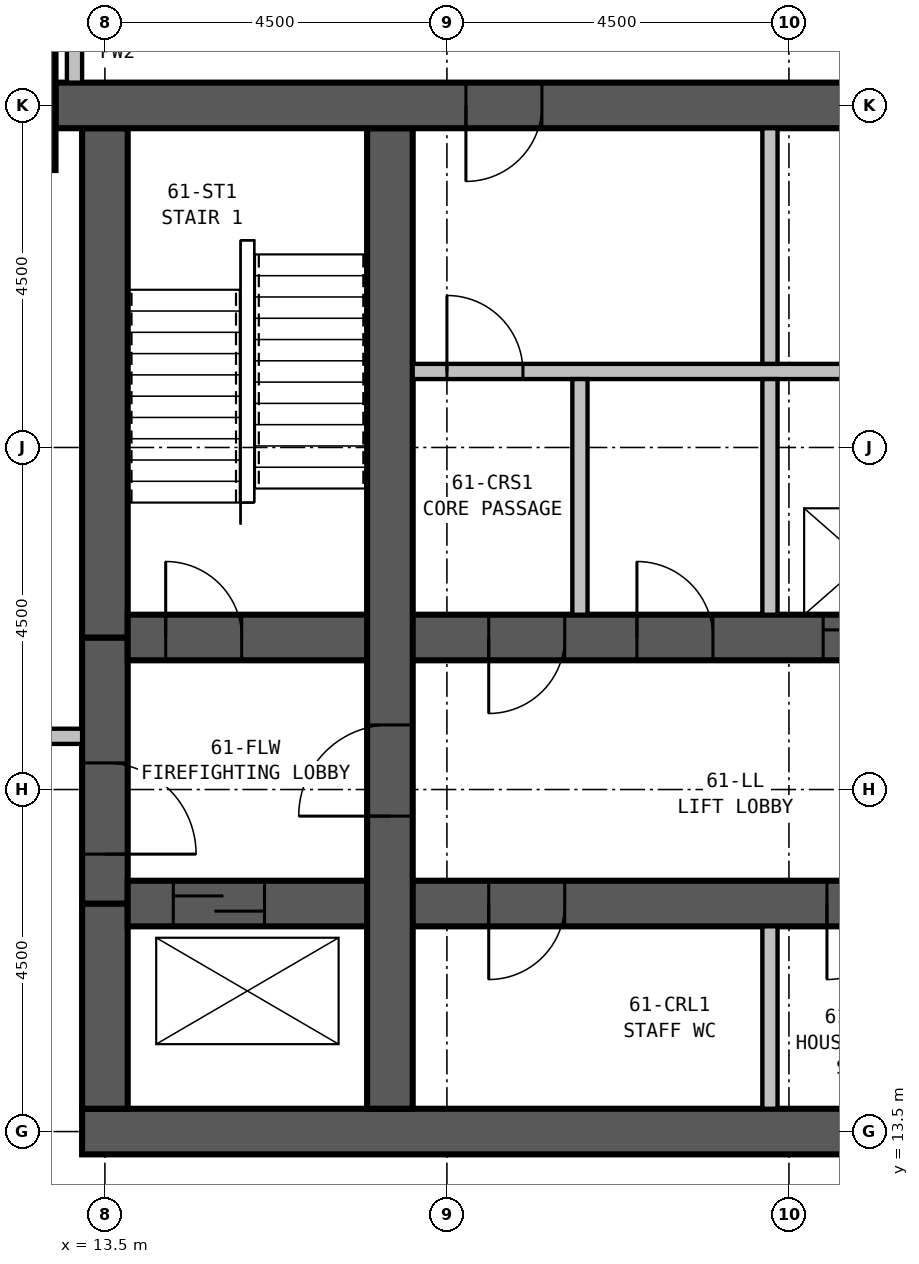
"""IFC4 building model, lengths in metres.
Left out: names, types, materials, properties, quantities, classifications, styles, units other than length and angle.
Written with IfcOpenShell. Run it as: python <this file> out.ifc"""

import sys

from ifc_helpers import new_model, si_unit, direction, frame, frame_2d, origin, origin_2d, place, context, subcontext, project, spatial, rectangle, extrude, element, fill, save


model = new_model("IFC4")
c1 = context("Model", 3, precision=1e-05, world=origin(), true_north=direction((0.0, 1.0)))
c2 = subcontext(c1, "Body", "Model", "MODEL_VIEW")
j1 = project(units=[si_unit("LENGTHUNIT", "METRE"), si_unit("PLANEANGLEUNIT", "RADIAN")], contexts=[c1])
p1 = place(None, origin())
s1 = spatial("IfcSite", under=j1, at=p1, CompositionType="ELEMENT")
p2 = place(p1, origin())
s2 = spatial("IfcBuilding", under=s1, at=p2, CompositionType="ELEMENT")
p3 = place(p2, frame((0.0, 0.0, 236.9)))
s3 = spatial("IfcBuildingStorey", under=s2, at=p3, CompositionType="ELEMENT", Elevation=236.9)
p4 = place(p3, frame((12.0, 27.0, 0.0), z_axis=(0.0, 0.0, 1.0), x_axis=(1.0, 0.0, 0.0)))
e1 = element("IfcColumn", 1, at=p4, inside=s3, PredefinedType="COLUMN", context=c2, shape_type="SweptSolid", body=[
    extrude(rectangle(XDim=1.7, YDim=1.7, at=origin_2d()), origin(), (0.0, 0.0, 1.0), 3.9),
])
p5 = place(p3, frame((13.2, 13.5, 0.0), z_axis=(0.0, 0.0, 1.0), x_axis=(1.0, 0.0, 0.0)))
e2 = element("IfcWall", 2, at=p5, inside=s3, PredefinedType="SHEAR", context=c2, shape_type="SweptSolid", body=[
    extrude(rectangle(XDim=23.1, YDim=0.6, at=frame_2d((11.55, 0.0))), origin(), (0.0, 0.0, 1.0), 3.9),
])
p6 = place(p3, frame((36.3, 27.0, 0.0), z_axis=(0.0, 0.0, 1.0), x_axis=(-1.0, 0.0, 0.0)))
e3 = element("IfcWall", 3, at=p6, inside=s3, PredefinedType="SHEAR", context=c2, shape_type="SweptSolid", body=[
    extrude(rectangle(XDim=23.45, YDim=0.6, at=frame_2d((11.725, 0.0))), origin(), (0.0, 0.0, 1.0), 3.9),
])
p7 = place(p6, frame((17.05, 0.0, 0.0)))
e4 = element("IfcOpeningElement", 4, at=p7, cuts=e3, PredefinedType="OPENING", context=c2, shape_type="SweptSolid", body=[
    extrude(rectangle(XDim=1.0, YDim=2.1, at=frame_2d((0.5, 1.05))), frame((0.0, 0.31, 0.0), z_axis=(0.0, -1.0, 0.0), x_axis=(1.0, 0.0, 0.0)), (0.0, 0.0, 1.0), 0.62),
])
p8 = place(p6, frame((12.05, 0.0, 0.0)))
e5 = element("IfcOpeningElement", 5, at=p8, cuts=e3, PredefinedType="OPENING", context=c2, shape_type="SweptSolid", body=[
    extrude(rectangle(XDim=1.0, YDim=2.1, at=frame_2d((0.5, 1.05))), frame((0.0, 0.31, 0.0), z_axis=(0.0, -1.0, 0.0), x_axis=(1.0, 0.0, 0.0)), (0.0, 0.0, 1.0), 0.62),
])
p9 = place(p6, frame((7.05, 0.0, 0.0)))
e6 = element("IfcOpeningElement", 6, at=p9, cuts=e3, PredefinedType="OPENING", context=c2, shape_type="SweptSolid", body=[
    extrude(rectangle(XDim=1.0, YDim=2.1, at=frame_2d((0.5, 1.05))), frame((0.0, 0.31, 0.0), z_axis=(0.0, -1.0, 0.0), x_axis=(1.0, 0.0, 0.0)), (0.0, 0.0, 1.0), 0.62),
])
p10 = place(p3, frame((17.25, 13.8, 0.0), z_axis=(0.0, 0.0, 1.0), x_axis=(0.0, 1.0, 0.0)))
e7 = element("IfcWall", 7, at=p10, inside=s3, PredefinedType="SHEAR", context=c2, shape_type="SweptSolid", body=[
    extrude(rectangle(XDim=12.9, YDim=0.6, at=frame_2d((6.45, 0.0))), origin(), (0.0, 0.0, 1.0), 3.9),
])
p11 = place(p10, frame((3.85, 0.0, 0.0)))
e8 = element("IfcOpeningElement", 8, at=p11, cuts=e7, PredefinedType="OPENING", context=c2, shape_type="SweptSolid", body=[
    extrude(rectangle(XDim=1.2, YDim=2.1, at=frame_2d((0.6, 1.05))), frame((0.0, 0.31, 0.0), z_axis=(0.0, -1.0, 0.0), x_axis=(1.0, 0.0, 0.0)), (0.0, 0.0, 1.0), 0.62),
])
p12 = place(p3, frame((13.8, 16.5, 0.0), z_axis=(0.0, 0.0, 1.0), x_axis=(1.0, 0.0, 0.0)))
e9 = element("IfcWall", 9, at=p12, inside=s3, PredefinedType="SHEAR", context=c2, shape_type="SweptSolid", body=[
    extrude(rectangle(XDim=21.9, YDim=0.6, at=frame_2d((10.95, 0.0))), origin(), (0.0, 0.0, 1.0), 3.9),
])
p13 = place(p12, frame((5.75, 0.0, 0.0), z_axis=(0.0, 0.0, 1.0), x_axis=(-1.0, 0.0, 0.0)))
e10 = element("IfcOpeningElement", 10, at=p13, cuts=e9, PredefinedType="OPENING", context=c2, shape_type="SweptSolid", body=[
    extrude(rectangle(XDim=1.0, YDim=2.1, at=frame_2d((0.5, 1.05))), frame((0.0, 0.31, 0.0), z_axis=(0.0, -1.0, 0.0), x_axis=(1.0, 0.0, 0.0)), (0.0, 0.0, 1.0), 0.62),
])
p14 = place(p12, frame((10.2, 0.0, 0.0), z_axis=(0.0, 0.0, 1.0), x_axis=(-1.0, 0.0, 0.0)))
e11 = element("IfcOpeningElement", 11, at=p14, cuts=e9, PredefinedType="OPENING", context=c2, shape_type="SweptSolid", body=[
    extrude(rectangle(XDim=1.0, YDim=2.1, at=frame_2d((0.5, 1.05))), frame((0.0, 0.31, 0.0), z_axis=(0.0, -1.0, 0.0), x_axis=(1.0, 0.0, 0.0)), (0.0, 0.0, 1.0), 0.62),
])
p15 = place(p12, frame((12.7, 0.0, 0.0), z_axis=(0.0, 0.0, 1.0), x_axis=(-1.0, 0.0, 0.0)))
e12 = element("IfcOpeningElement", 12, at=p15, cuts=e9, PredefinedType="OPENING", context=c2, shape_type="SweptSolid", body=[
    extrude(rectangle(XDim=1.0, YDim=2.1, at=frame_2d((0.5, 1.05))), frame((0.0, 0.31, 0.0), z_axis=(0.0, -1.0, 0.0), x_axis=(1.0, 0.0, 0.0)), (0.0, 0.0, 1.0), 0.62),
])
p16 = place(p12, frame((17.15, 0.0, 0.0), z_axis=(0.0, 0.0, 1.0), x_axis=(-1.0, 0.0, 0.0)))
e13 = element("IfcOpeningElement", 13, at=p16, cuts=e9, PredefinedType="OPENING", context=c2, shape_type="SweptSolid", body=[
    extrude(rectangle(XDim=1.0, YDim=2.1, at=frame_2d((0.5, 1.05))), frame((0.0, 0.31, 0.0), z_axis=(0.0, -1.0, 0.0), x_axis=(1.0, 0.0, 0.0)), (0.0, 0.0, 1.0), 0.62),
])
p17 = place(p12, frame((0.6, 0.0, 0.0)))
e14 = element("IfcOpeningElement", 14, at=p17, cuts=e9, PredefinedType="OPENING", context=c2, shape_type="SweptSolid", body=[
    extrude(rectangle(XDim=1.2, YDim=2.1, at=frame_2d((0.6, 1.05))), frame((0.0, 0.31, 0.0), z_axis=(0.0, -1.0, 0.0), x_axis=(1.0, 0.0, 0.0)), (0.0, 0.0, 1.0), 0.62),
])
p18 = place(p12, frame((19.6, 0.0, 0.0)))
e15 = element("IfcOpeningElement", 15, at=p18, cuts=e9, PredefinedType="OPENING", context=c2, shape_type="SweptSolid", body=[
    extrude(rectangle(XDim=1.2, YDim=2.1, at=frame_2d((0.6, 1.05))), frame((0.0, 0.31, 0.0), z_axis=(0.0, -1.0, 0.0), x_axis=(1.0, 0.0, 0.0)), (0.0, 0.0, 1.0), 0.62),
])
p19 = place(p3, frame((13.8, 20.0, 0.0), z_axis=(0.0, 0.0, 1.0), x_axis=(1.0, 0.0, 0.0)))
e16 = element("IfcWall", 16, at=p19, inside=s3, PredefinedType="SHEAR", context=c2, shape_type="SweptSolid", body=[
    extrude(rectangle(XDim=21.9, YDim=0.6, at=frame_2d((10.95, 0.0))), origin(), (0.0, 0.0, 1.0), 3.9),
])
p20 = place(p19, frame((0.5, 0.0, 0.0)))
e17 = element("IfcOpeningElement", 17, at=p20, cuts=e16, PredefinedType="OPENING", context=c2, shape_type="SweptSolid", body=[
    extrude(rectangle(XDim=1.0, YDim=2.1, at=frame_2d((0.5, 1.05))), frame((0.0, 0.31, 0.0), z_axis=(0.0, -1.0, 0.0), x_axis=(1.0, 0.0, 0.0)), (0.0, 0.0, 1.0), 0.62),
])
p21 = place(p19, frame((20.5, 0.0, 0.0)))
e18 = element("IfcOpeningElement", 18, at=p21, cuts=e16, PredefinedType="OPENING", context=c2, shape_type="SweptSolid", body=[
    extrude(rectangle(XDim=1.0, YDim=2.1, at=frame_2d((0.5, 1.05))), frame((0.0, 0.31, 0.0), z_axis=(0.0, -1.0, 0.0), x_axis=(1.0, 0.0, 0.0)), (0.0, 0.0, 1.0), 0.62),
])
p22 = place(p19, frame((9.15, 0.0, 0.0)))
e19 = element("IfcOpeningElement", 19, at=p22, cuts=e16, PredefinedType="OPENING", context=c2, shape_type="SweptSolid", body=[
    extrude(rectangle(XDim=1.1, YDim=2.1, at=frame_2d((0.55, 1.05))), frame((0.0, 0.31, 0.0), z_axis=(0.0, -1.0, 0.0), x_axis=(1.0, 0.0, 0.0)), (0.0, 0.0, 1.0), 0.62),
])
p23 = place(p19, frame((11.65, 0.0, 0.0)))
e20 = element("IfcOpeningElement", 20, at=p23, cuts=e16, PredefinedType="OPENING", context=c2, shape_type="SweptSolid", body=[
    extrude(rectangle(XDim=1.1, YDim=2.1, at=frame_2d((0.55, 1.05))), frame((0.0, 0.31, 0.0), z_axis=(0.0, -1.0, 0.0), x_axis=(1.0, 0.0, 0.0)), (0.0, 0.0, 1.0), 0.62),
])
p24 = place(p19, frame((14.15, 0.0, 0.0)))
e21 = element("IfcOpeningElement", 21, at=p24, cuts=e16, PredefinedType="OPENING", context=c2, shape_type="SweptSolid", body=[
    extrude(rectangle(XDim=1.1, YDim=2.1, at=frame_2d((0.55, 1.05))), frame((0.0, 0.31, 0.0), z_axis=(0.0, -1.0, 0.0), x_axis=(1.0, 0.0, 0.0)), (0.0, 0.0, 1.0), 0.62),
])
p25 = place(p19, frame((16.65, 0.0, 0.0)))
e22 = element("IfcOpeningElement", 22, at=p25, cuts=e16, PredefinedType="OPENING", context=c2, shape_type="SweptSolid", body=[
    extrude(rectangle(XDim=1.1, YDim=2.1, at=frame_2d((0.55, 1.05))), frame((0.0, 0.31, 0.0), z_axis=(0.0, -1.0, 0.0), x_axis=(1.0, 0.0, 0.0)), (0.0, 0.0, 1.0), 0.62),
])
p26 = place(p19, frame((5.75, 0.0, 0.0), z_axis=(0.0, 0.0, 1.0), x_axis=(-1.0, 0.0, 0.0)))
e23 = element("IfcOpeningElement", 23, at=p26, cuts=e16, PredefinedType="OPENING", context=c2, shape_type="SweptSolid", body=[
    extrude(rectangle(XDim=1.0, YDim=2.1, at=frame_2d((0.5, 1.05))), frame((0.0, 0.31, 0.0), z_axis=(0.0, -1.0, 0.0), x_axis=(1.0, 0.0, 0.0)), (0.0, 0.0, 1.0), 0.62),
])
p27 = place(p19, frame((6.7, 0.0, 0.0)))
e24 = element("IfcOpeningElement", 24, at=p27, cuts=e16, PredefinedType="OPENING", context=c2, shape_type="SweptSolid", body=[
    extrude(rectangle(XDim=1.0, YDim=2.1, at=frame_2d((0.5, 1.05))), frame((0.0, 0.31, 0.0), z_axis=(0.0, -1.0, 0.0), x_axis=(1.0, 0.0, 0.0)), (0.0, 0.0, 1.0), 0.62),
])
p28 = place(p3, frame((13.5, 26.7, 0.0), z_axis=(0.0, 0.0, 1.0), x_axis=(0.0, -1.0, 0.0)))
e25 = element("IfcWall", 25, at=p28, inside=s3, PredefinedType="SHEAR", context=c2, shape_type="SweptSolid", body=[
    extrude(rectangle(XDim=6.7, YDim=0.6, at=frame_2d((3.35, 0.0))), origin(), (0.0, 0.0, 1.0), 3.9),
])
p29 = place(p3, frame((13.5, 20.0, 0.0), z_axis=(0.0, 0.0, 1.0), x_axis=(0.0, -1.0, 0.0)))
e26 = element("IfcWall", 26, at=p29, inside=s3, PredefinedType="SHEAR", context=c2, shape_type="SweptSolid", body=[
    extrude(rectangle(XDim=3.5, YDim=0.6, at=frame_2d((1.75, 0.0))), origin(), (0.0, 0.0, 1.0), 3.9),
])
p30 = place(p29, frame((1.65, 0.0, 0.0)))
e27 = element("IfcOpeningElement", 27, at=p30, cuts=e26, PredefinedType="OPENING", context=c2, shape_type="SweptSolid", body=[
    extrude(rectangle(XDim=1.2, YDim=2.1, at=frame_2d((0.6, 1.05))), frame((0.0, 0.31, 0.0), z_axis=(0.0, -1.0, 0.0), x_axis=(1.0, 0.0, 0.0)), (0.0, 0.0, 1.0), 0.62),
])
p31 = place(p3, frame((13.5, 16.5, 0.0), z_axis=(0.0, 0.0, 1.0), x_axis=(0.0, -1.0, 0.0)))
e28 = element("IfcWall", 28, at=p31, inside=s3, PredefinedType="SHEAR", context=c2, shape_type="SweptSolid", body=[
    extrude(rectangle(XDim=2.7, YDim=0.6, at=frame_2d((1.35, 0.0))), origin(), (0.0, 0.0, 1.0), 3.9),
])
p32 = place(p3, frame((13.517, 40.649, 0.0), z_axis=(0.0, 0.0, 1.0), x_axis=(-0.110433201132, -0.993883548555, 0.0)))
e29 = element("IfcWall", 29, at=p32, inside=s3, PredefinedType="STANDARD", context=c2, shape_type="SweptSolid", body=[
    extrude(rectangle(XDim=31.994, YDim=0.3, at=frame_2d((15.997, 0.0))), origin(), (0.0, 0.0, 1.0), 2.5),
])
p33 = place(p32, frame((1.664, 0.0, 0.5)))
e30 = element("IfcOpeningElement", 30, at=p33, cuts=e29, PredefinedType="OPENING", context=c2, shape_type="SweptSolid", body=[
    extrude(rectangle(XDim=1.5, YDim=1.85, at=frame_2d((0.75, 0.925))), frame((0.0, 0.16, 0.0), z_axis=(0.0, -1.0, 0.0), x_axis=(1.0, 0.0, 0.0)), (0.0, 0.0, 1.0), 0.32),
])
p34 = place(p32, frame((6.192, 0.0, 0.5)))
e31 = element("IfcOpeningElement", 31, at=p34, cuts=e29, PredefinedType="OPENING", context=c2, shape_type="SweptSolid", body=[
    extrude(rectangle(XDim=1.5, YDim=1.85, at=frame_2d((0.75, 0.925))), frame((0.0, 0.16, 0.0), z_axis=(0.0, -1.0, 0.0), x_axis=(1.0, 0.0, 0.0)), (0.0, 0.0, 1.0), 0.32),
])
p35 = place(p32, frame((15.247, 0.0, 0.5)))
e32 = element("IfcOpeningElement", 32, at=p35, cuts=e29, PredefinedType="OPENING", context=c2, shape_type="SweptSolid", body=[
    extrude(rectangle(XDim=1.5, YDim=1.85, at=frame_2d((0.75, 0.925))), frame((0.0, 0.16, 0.0), z_axis=(0.0, -1.0, 0.0), x_axis=(1.0, 0.0, 0.0)), (0.0, 0.0, 1.0), 0.32),
])
p36 = place(p32, frame((19.775, 0.0, 0.5)))
e33 = element("IfcOpeningElement", 33, at=p36, cuts=e29, PredefinedType="OPENING", context=c2, shape_type="SweptSolid", body=[
    extrude(rectangle(XDim=1.5, YDim=1.85, at=frame_2d((0.75, 0.925))), frame((0.0, 0.16, 0.0), z_axis=(0.0, -1.0, 0.0), x_axis=(1.0, 0.0, 0.0)), (0.0, 0.0, 1.0), 0.32),
])
p37 = place(p32, frame((24.302, 0.0, 0.5)))
e34 = element("IfcOpeningElement", 34, at=p37, cuts=e29, PredefinedType="OPENING", context=c2, shape_type="SweptSolid", body=[
    extrude(rectangle(XDim=1.5, YDim=1.85, at=frame_2d((0.75, 0.925))), frame((0.0, 0.16, 0.0), z_axis=(0.0, -1.0, 0.0), x_axis=(1.0, 0.0, 0.0)), (0.0, 0.0, 1.0), 0.32),
])
p38 = place(p32, frame((28.83, 0.0, 0.5)))
e35 = element("IfcOpeningElement", 35, at=p38, cuts=e29, PredefinedType="OPENING", context=c2, shape_type="SweptSolid", body=[
    extrude(rectangle(XDim=1.5, YDim=1.85, at=frame_2d((0.75, 0.925))), frame((0.0, 0.16, 0.0), z_axis=(0.0, -1.0, 0.0), x_axis=(1.0, 0.0, 0.0)), (0.0, 0.0, 1.0), 0.32),
])
p39 = place(p3, frame((13.2, 18.7, 0.0), z_axis=(0.0, 0.0, 1.0), x_axis=(-1.0, 0.0, 0.0)))
e36 = element("IfcWall", 36, at=p39, inside=s3, PredefinedType="PARTITIONING", context=c2, shape_type="SweptSolid", body=[
    extrude(rectangle(XDim=1.35, YDim=0.2, at=frame_2d((0.675, 0.0))), origin(), (0.0, 0.0, 1.0), 3.65),
])
p40 = place(p3, frame((13.1, 27.3, 0.0), z_axis=(0.0, 0.0, 1.0), x_axis=(0.0, 1.0, 0.0)))
e37 = element("IfcWall", 37, at=p40, inside=s3, PredefinedType="PARTITIONING", context=c2, shape_type="SweptSolid", body=[
    extrude(rectangle(XDim=1.9, YDim=0.2, at=frame_2d((0.95, 0.0))), origin(), (0.0, 0.0, 1.0), 2.5),
])
p41 = place(p3, frame((19.75, 20.3, 0.0), z_axis=(0.0, 0.0, 1.0), x_axis=(0.0, 1.0, 0.0)))
e38 = element("IfcWall", 38, at=p41, inside=s3, PredefinedType="PARTITIONING", context=c2, shape_type="SweptSolid", body=[
    extrude(rectangle(XDim=3.1, YDim=0.2, at=frame_2d((1.55, 0.0))), origin(), (0.0, 0.0, 1.0), 3.65),
])
p42 = place(p3, frame((22.25, 13.8, 0.0), z_axis=(0.0, 0.0, 1.0), x_axis=(0.0, 1.0, 0.0)))
e39 = element("IfcWall", 39, at=p42, inside=s3, PredefinedType="PARTITIONING", context=c2, shape_type="SweptSolid", body=[
    extrude(rectangle(XDim=2.4, YDim=0.2, at=frame_2d((1.2, 0.0))), origin(), (0.0, 0.0, 1.0), 3.65),
])
p43 = place(p3, frame((22.25, 20.3, 0.0), z_axis=(0.0, 0.0, 1.0), x_axis=(0.0, 1.0, 0.0)))
e40 = element("IfcWall", 40, at=p43, inside=s3, PredefinedType="PARTITIONING", context=c2, shape_type="SweptSolid", body=[
    extrude(rectangle(XDim=3.1, YDim=0.2, at=frame_2d((1.55, 0.0))), origin(), (0.0, 0.0, 1.0), 3.65),
])
p44 = place(p3, frame((17.55, 23.5, 0.0), z_axis=(0.0, 0.0, 1.0), x_axis=(1.0, 0.0, 0.0)))
e41 = element("IfcWall", 41, at=p44, inside=s3, PredefinedType="PARTITIONING", context=c2, shape_type="SweptSolid", body=[
    extrude(rectangle(XDim=14.4, YDim=0.2, at=frame_2d((7.2, 0.0))), origin(), (0.0, 0.0, 1.0), 3.65),
])
p45 = place(p44, frame((0.45, 0.0, 0.0)))
e42 = element("IfcOpeningElement", 42, at=p45, cuts=e41, PredefinedType="OPENING", context=c2, shape_type="SweptSolid", body=[
    extrude(rectangle(XDim=1.0, YDim=2.1, at=frame_2d((0.5, 1.05))), frame((0.0, 0.11, 0.0), z_axis=(0.0, -1.0, 0.0), x_axis=(1.0, 0.0, 0.0)), (0.0, 0.0, 1.0), 0.22),
])
p46 = place(p3, frame((22.25, 23.6, 0.0), z_axis=(0.0, 0.0, 1.0), x_axis=(0.0, 1.0, 0.0)))
e43 = element("IfcWall", 43, at=p46, inside=s3, PredefinedType="PARTITIONING", context=c2, shape_type="SweptSolid", body=[
    extrude(rectangle(XDim=3.1, YDim=0.2, at=frame_2d((1.55, 0.0))), origin(), (0.0, 0.0, 1.0), 3.65),
])
p47 = place(p45, origin())
e44 = element("IfcDoor", 44, at=p47, inside=s3, OperationType="SINGLE_SWING_LEFT", PredefinedType="DOOR", context=c2, shape_type="SweptSolid", body=[
    extrude(rectangle(XDim=1.0, YDim=2.1, at=frame_2d((0.5, 1.05))), frame((0.0, 0.025, 0.0), z_axis=(0.0, -1.0, 0.0), x_axis=(1.0, 0.0, 0.0)), (0.0, 0.0, 1.0), 0.05),
])
fill(e42, e44)
p48 = place(p30, origin())
e45 = element("IfcDoor", 45, at=p48, inside=s3, OperationType="SINGLE_SWING_RIGHT", PredefinedType="DOOR", context=c2, shape_type="SweptSolid", body=[
    extrude(rectangle(XDim=1.2, YDim=2.1, at=frame_2d((0.6, 1.05))), frame((0.0, 0.3, 0.0), z_axis=(0.0, -1.0, 0.0), x_axis=(1.0, 0.0, 0.0)), (0.0, 0.0, 1.0), 0.6),
])
fill(e27, e45)
p49 = place(p11, origin())
e46 = element("IfcDoor", 46, at=p49, inside=s3, OperationType="SINGLE_SWING_LEFT", PredefinedType="DOOR", context=c2, shape_type="SweptSolid", body=[
    extrude(rectangle(XDim=1.2, YDim=2.1, at=frame_2d((0.6, 1.05))), frame((0.0, 0.3, 0.0), z_axis=(0.0, -1.0, 0.0), x_axis=(1.0, 0.0, 0.0)), (0.0, 0.0, 1.0), 0.6),
])
fill(e8, e46)
p50 = place(p20, origin())
e47 = element("IfcDoor", 47, at=p50, inside=s3, OperationType="SINGLE_SWING_LEFT", PredefinedType="DOOR", context=c2, shape_type="SweptSolid", body=[
    extrude(rectangle(XDim=1.0, YDim=2.1, at=frame_2d((0.5, 1.05))), frame((0.0, 0.3, 0.0), z_axis=(0.0, -1.0, 0.0), x_axis=(1.0, 0.0, 0.0)), (0.0, 0.0, 1.0), 0.6),
])
fill(e17, e47)
p51 = place(p22, origin())
e48 = element("IfcDoor", 48, at=p51, inside=s3, OperationType="SLIDING_TO_LEFT", PredefinedType="DOOR", context=c2, shape_type="SweptSolid", body=[
    extrude(rectangle(XDim=1.1, YDim=2.1, at=frame_2d((0.55, 1.05))), frame((0.0, 0.3, 0.0), z_axis=(0.0, -1.0, 0.0), x_axis=(1.0, 0.0, 0.0)), (0.0, 0.0, 1.0), 0.6),
])
fill(e19, e48)
p52 = place(p13, origin())
e49 = element("IfcDoor", 49, at=p52, inside=s3, OperationType="SINGLE_SWING_RIGHT", PredefinedType="DOOR", context=c2, shape_type="SweptSolid", body=[
    extrude(rectangle(XDim=1.0, YDim=2.1, at=frame_2d((0.5, 1.05))), frame((0.0, 0.3, 0.0), z_axis=(0.0, -1.0, 0.0), x_axis=(1.0, 0.0, 0.0)), (0.0, 0.0, 1.0), 0.6),
])
fill(e10, e49)
p53 = place(p14, origin())
e50 = element("IfcDoor", 50, at=p53, inside=s3, OperationType="SINGLE_SWING_RIGHT", PredefinedType="DOOR", context=c2, shape_type="SweptSolid", body=[
    extrude(rectangle(XDim=1.0, YDim=2.1, at=frame_2d((0.5, 1.05))), frame((0.0, 0.3, 0.0), z_axis=(0.0, -1.0, 0.0), x_axis=(1.0, 0.0, 0.0)), (0.0, 0.0, 1.0), 0.6),
])
fill(e11, e50)
p54 = place(p26, origin())
e51 = element("IfcDoor", 51, at=p54, inside=s3, OperationType="SINGLE_SWING_RIGHT", PredefinedType="DOOR", context=c2, shape_type="SweptSolid", body=[
    extrude(rectangle(XDim=1.0, YDim=2.1, at=frame_2d((0.5, 1.05))), frame((0.0, 0.3, 0.0), z_axis=(0.0, -1.0, 0.0), x_axis=(1.0, 0.0, 0.0)), (0.0, 0.0, 1.0), 0.6),
])
fill(e23, e51)
p55 = place(p27, origin())
e52 = element("IfcDoor", 52, at=p55, inside=s3, OperationType="SINGLE_SWING_LEFT", PredefinedType="DOOR", context=c2, shape_type="SweptSolid", body=[
    extrude(rectangle(XDim=1.0, YDim=2.1, at=frame_2d((0.5, 1.05))), frame((0.0, 0.3, 0.0), z_axis=(0.0, -1.0, 0.0), x_axis=(1.0, 0.0, 0.0)), (0.0, 0.0, 1.0), 0.6),
])
fill(e24, e52)
p56 = place(p17, origin())
e53 = element("IfcDoor", 53, at=p56, inside=s3, OperationType="SLIDING_TO_LEFT", PredefinedType="DOOR", context=c2, shape_type="SweptSolid", body=[
    extrude(rectangle(XDim=1.2, YDim=2.1, at=frame_2d((0.6, 1.05))), frame((0.0, 0.3, 0.0), z_axis=(0.0, -1.0, 0.0), x_axis=(1.0, 0.0, 0.0)), (0.0, 0.0, 1.0), 0.6),
])
fill(e14, e53)
p57 = place(p7, origin())
e54 = element("IfcDoor", 54, at=p57, inside=s3, OperationType="SINGLE_SWING_RIGHT", PredefinedType="DOOR", context=c2, shape_type="SweptSolid", body=[
    extrude(rectangle(XDim=1.0, YDim=2.1, at=frame_2d((0.5, 1.05))), frame((0.0, 0.3, 0.0), z_axis=(0.0, -1.0, 0.0), x_axis=(1.0, 0.0, 0.0)), (0.0, 0.0, 1.0), 0.6),
])
fill(e4, e54)
save(model, sys.argv[1])
